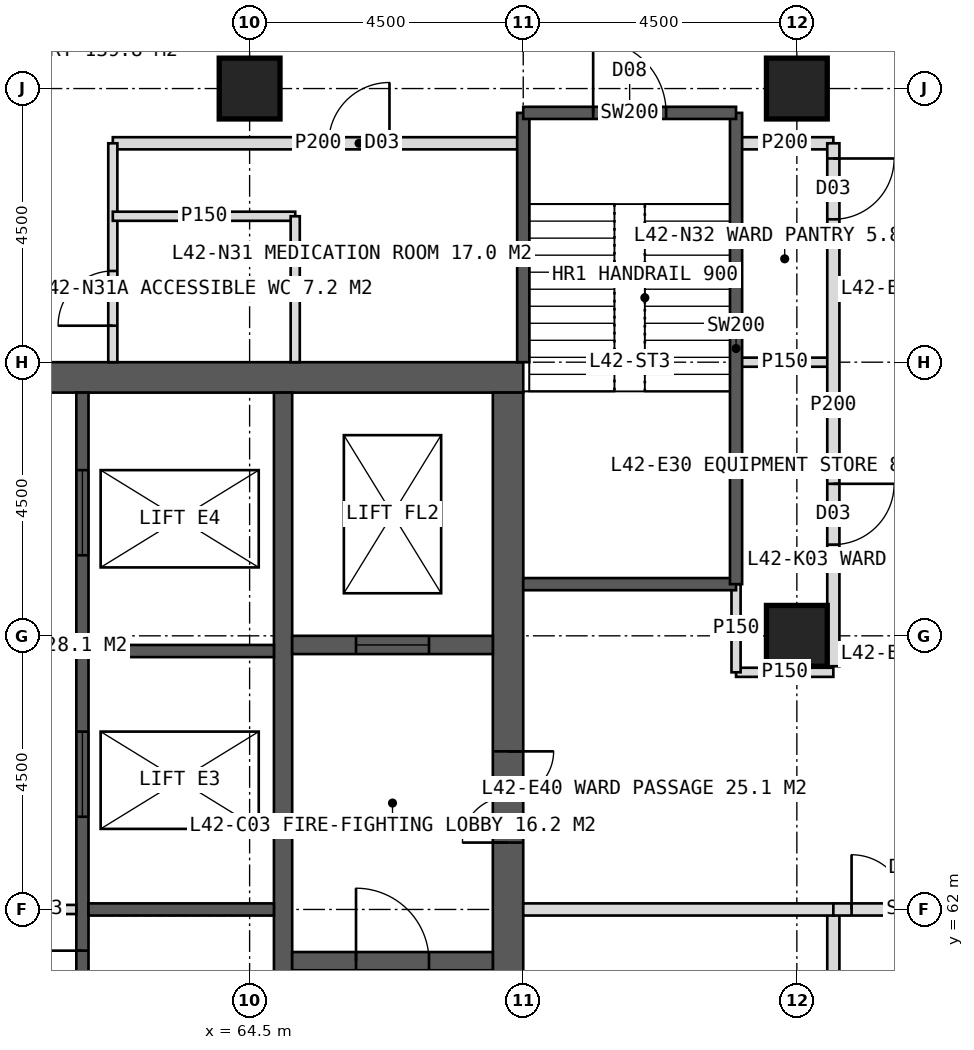
"""IFC4 building model, lengths in metres.
Left out: names, types, materials, properties, quantities, classifications, styles, units other than length and angle.
Written with IfcOpenShell. Run it as: python <this file> out.ifc"""

import sys

from ifc_helpers import new_model, si_unit, direction, frame, frame_2d, origin, origin_2d, place, context, subcontext, project, spatial, rectangle, hollow_rectangle, extrude, element, fill, save


model = new_model("IFC4")
c1 = context("Model", 3, precision=1e-05, world=origin(), true_north=direction((0.0, 1.0)))
c2 = subcontext(c1, "Body", "Model", "MODEL_VIEW")
j1 = project(units=[si_unit("LENGTHUNIT", "METRE"), si_unit("PLANEANGLEUNIT", "RADIAN")], contexts=[c1])
p1 = place(None, origin())
s1 = spatial("IfcSite", under=j1, at=p1, CompositionType="ELEMENT")
p2 = place(p1, origin())
s2 = spatial("IfcBuilding", under=s1, at=p2, CompositionType="ELEMENT")
p3 = place(p2, frame((0.0, 0.0, 177.0)))
s3 = spatial("IfcBuildingStorey", under=s2, at=p3, CompositionType="ELEMENT", Elevation=177.0)
p4 = place(p3, frame((51.0, 70.75, 0.0), z_axis=(0.0, 0.0, 1.0), x_axis=(1.0, 0.0, 0.0)))
e1 = element("IfcWall", 1, at=p4, inside=s3, PredefinedType="SHEAR", context=c2, shape_type="SweptSolid", body=[
    extrude(rectangle(XDim=18.0, YDim=0.5, at=frame_2d((9.0, 0.0))), origin(), (0.0, 0.0, 1.0), 4.0),
])
p5 = place(p4, frame((8.1, 0.0, 0.0)))
e2 = element("IfcOpeningElement", 2, at=p5, cuts=e1, PredefinedType="OPENING", context=c2, shape_type="SweptSolid", body=[
    extrude(rectangle(XDim=1.8, YDim=2.2, at=frame_2d((0.9, 1.1))), frame((0.0, 0.26, 0.0), z_axis=(0.0, -1.0, 0.0), x_axis=(1.0, 0.0, 0.0)), (0.0, 0.0, 1.0), 0.52),
])
p6 = place(p3, frame((68.75, 53.5, 0.0), z_axis=(0.0, 0.0, 1.0), x_axis=(0.0, 1.0, 0.0)))
e3 = element("IfcWall", 3, at=p6, inside=s3, PredefinedType="SHEAR", context=c2, shape_type="SweptSolid", body=[
    extrude(rectangle(XDim=17.0, YDim=0.5, at=frame_2d((8.5, 0.0))), origin(), (0.0, 0.0, 1.0), 4.0),
])
p7 = place(p6, frame((9.6, 0.0, 0.0)))
e4 = element("IfcOpeningElement", 4, at=p7, cuts=e3, PredefinedType="OPENING", context=c2, shape_type="SweptSolid", body=[
    extrude(rectangle(XDim=1.5, YDim=2.2, at=frame_2d((0.75, 1.1))), frame((0.0, 0.26, 0.0), z_axis=(0.0, -1.0, 0.0), x_axis=(1.0, 0.0, 0.0)), (0.0, 0.0, 1.0), 0.52),
])
p8 = place(p3, frame((65.05, 53.5, 0.0), z_axis=(0.0, 0.0, 1.0), x_axis=(0.0, 1.0, 0.0)))
e5 = element("IfcWall", 5, at=p8, inside=s3, PredefinedType="SHEAR", context=c2, shape_type="SweptSolid", body=[
    extrude(rectangle(XDim=17.0, YDim=0.3, at=frame_2d((8.5, 0.0))), origin(), (0.0, 0.0, 1.0), 4.0),
])
p9 = place(p3, frame((61.75, 53.5, 0.0), z_axis=(0.0, 0.0, 1.0), x_axis=(0.0, 1.0, 0.0)))
e6 = element("IfcWall", 6, at=p9, inside=s3, PredefinedType="SHEAR", context=c2, shape_type="SweptSolid", body=[
    extrude(rectangle(XDim=17.0, YDim=0.2, at=frame_2d((8.5, 0.0))), origin(), (0.0, 0.0, 1.0), 4.0),
])
p10 = place(p9, frame((0.808, 0.0, 0.0)))
e7 = element("IfcOpeningElement", 7, at=p10, cuts=e6, PredefinedType="OPENING", context=c2, shape_type="SweptSolid", body=[
    extrude(rectangle(XDim=1.0, YDim=2.1, at=frame_2d((0.5, 1.05))), frame((0.0, 0.11, 0.0), z_axis=(0.0, -1.0, 0.0), x_axis=(1.0, 0.0, 0.0)), (0.0, 0.0, 1.0), 0.22),
])
p11 = place(p9, frame((2.958, 0.0, 0.0)))
e8 = element("IfcOpeningElement", 8, at=p11, cuts=e6, PredefinedType="OPENING", context=c2, shape_type="SweptSolid", body=[
    extrude(rectangle(XDim=1.0, YDim=2.1, at=frame_2d((0.5, 1.05))), frame((0.0, 0.11, 0.0), z_axis=(0.0, -1.0, 0.0), x_axis=(1.0, 0.0, 0.0)), (0.0, 0.0, 1.0), 0.22),
])
p12 = place(p9, frame((4.722, 0.0, 0.0)))
e9 = element("IfcOpeningElement", 9, at=p12, cuts=e6, PredefinedType="OPENING", context=c2, shape_type="SweptSolid", body=[
    extrude(rectangle(XDim=1.0, YDim=2.1, at=frame_2d((0.5, 1.05))), frame((0.0, 0.11, 0.0), z_axis=(0.0, -1.0, 0.0), x_axis=(1.0, 0.0, 0.0)), (0.0, 0.0, 1.0), 0.22),
])
p13 = place(p9, frame((6.823, 0.0, 0.0)))
e10 = element("IfcOpeningElement", 10, at=p13, cuts=e6, PredefinedType="OPENING", context=c2, shape_type="SweptSolid", body=[
    extrude(rectangle(XDim=1.0, YDim=2.1, at=frame_2d((0.5, 1.05))), frame((0.0, 0.11, 0.0), z_axis=(0.0, -1.0, 0.0), x_axis=(1.0, 0.0, 0.0)), (0.0, 0.0, 1.0), 0.22),
])
p14 = place(p9, frame((10.025, 0.0, 0.0)))
e11 = element("IfcOpeningElement", 11, at=p14, cuts=e6, PredefinedType="OPENING", context=c2, shape_type="SweptSolid", body=[
    extrude(rectangle(XDim=1.4, YDim=2.2, at=frame_2d((0.7, 1.1))), frame((0.0, 0.11, 0.0), z_axis=(0.0, -1.0, 0.0), x_axis=(1.0, 0.0, 0.0)), (0.0, 0.0, 1.0), 0.22),
])
p15 = place(p9, frame((14.325, 0.0, 0.0)))
e12 = element("IfcOpeningElement", 12, at=p15, cuts=e6, PredefinedType="OPENING", context=c2, shape_type="SweptSolid", body=[
    extrude(rectangle(XDim=1.4, YDim=2.2, at=frame_2d((0.7, 1.1))), frame((0.0, 0.11, 0.0), z_axis=(0.0, -1.0, 0.0), x_axis=(1.0, 0.0, 0.0)), (0.0, 0.0, 1.0), 0.22),
])
for number, where, z_axis, x_axis in (
    (13, (61.85, 62.0, 0.0), (0.0, 0.0, 1.0), (1.0, 0.0, 0.0)),
    (14, (61.85, 66.25, 0.0), (0.0, 0.0, 1.0), (1.0, 0.0, 0.0)),
):
    element("IfcWall", number, at=place(p3, frame(where, z_axis=z_axis, x_axis=x_axis)), inside=s3, PredefinedType="SHEAR", context=c2, shape_type="SweptSolid", body=[
        extrude(rectangle(XDim=3.05, YDim=0.2, at=frame_2d((1.525, 0.0))), origin(), (0.0, 0.0, 1.0), 4.0),
    ])
p16 = place(p3, frame((65.2, 61.15, 0.0), z_axis=(0.0, 0.0, 1.0), x_axis=(1.0, 0.0, 0.0)))
e15 = element("IfcWall", 15, at=p16, inside=s3, PredefinedType="SHEAR", context=c2, shape_type="SweptSolid", body=[
    extrude(rectangle(XDim=3.3, YDim=0.3, at=frame_2d((1.65, 0.0))), origin(), (0.0, 0.0, 1.0), 4.0),
])
p17 = place(p16, frame((1.05, 0.0, 0.0)))
e16 = element("IfcOpeningElement", 16, at=p17, cuts=e15, PredefinedType="OPENING", context=c2, shape_type="SweptSolid", body=[
    extrude(rectangle(XDim=1.2, YDim=2.1, at=frame_2d((0.6, 1.05))), frame((0.0, 0.16, 0.0), z_axis=(0.0, -1.0, 0.0), x_axis=(1.0, 0.0, 0.0)), (0.0, 0.0, 1.0), 0.32),
])
p18 = place(p3, frame((65.2, 66.35, 0.0), z_axis=(0.0, 0.0, 1.0), x_axis=(1.0, 0.0, 0.0)))
e17 = element("IfcWall", 17, at=p18, inside=s3, PredefinedType="SHEAR", context=c2, shape_type="SweptSolid", body=[
    extrude(rectangle(XDim=3.3, YDim=0.3, at=frame_2d((1.65, 0.0))), origin(), (0.0, 0.0, 1.0), 4.0),
])
p19 = place(p18, frame((1.05, 0.0, 0.0)))
e18 = element("IfcOpeningElement", 18, at=p19, cuts=e17, PredefinedType="OPENING", context=c2, shape_type="SweptSolid", body=[
    extrude(rectangle(XDim=1.2, YDim=2.2, at=frame_2d((0.6, 1.1))), frame((0.0, 0.16, 0.0), z_axis=(0.0, -1.0, 0.0), x_axis=(1.0, 0.0, 0.0)), (0.0, 0.0, 1.0), 0.32),
])
for number, where, z_axis, x_axis in (
    (19, (73.5, 75.5, 0.0), (0.0, 0.0, 1.0), (1.0, 0.0, 0.0)),
    (20, (64.5, 75.5, 0.0), (0.0, 0.0, 1.0), (1.0, 0.0, 0.0)),
    (21, (73.5, 66.5, 0.0), (0.0, 0.0, 1.0), (1.0, 0.0, 0.0)),
):
    element("IfcColumn", number, at=place(p3, frame(where, z_axis=z_axis, x_axis=x_axis)), inside=s3, PredefinedType="COLUMN", context=c2, shape_type="SweptSolid", body=[
        extrude(hollow_rectangle(XDim=1.0, YDim=1.0, WallThickness=0.1, at=origin_2d()), origin(), (0.0, 0.0, 1.0), 4.0),
    ])
p20 = place(p3, frame((62.25, 74.6, 0.0), z_axis=(0.0, 0.0, 1.0), x_axis=(1.0, 0.0, 0.0)))
e22 = element("IfcWall", 22, at=p20, inside=s3, PredefinedType="PARTITIONING", context=c2, shape_type="SweptSolid", body=[
    extrude(rectangle(XDim=6.75, YDim=0.2, at=frame_2d((3.375, 0.0))), origin(), (0.0, 0.0, 1.0), 3.75),
])
p21 = place(p20, frame((3.55, 0.0, 0.0)))
e23 = element("IfcOpeningElement", 23, at=p21, cuts=e22, PredefinedType="OPENING", context=c2, shape_type="SweptSolid", body=[
    extrude(rectangle(XDim=1.0, YDim=2.1, at=frame_2d((0.5, 1.05))), frame((0.0, 0.11, 0.0), z_axis=(0.0, -1.0, 0.0), x_axis=(1.0, 0.0, 0.0)), (0.0, 0.0, 1.0), 0.22),
])
p22 = place(p3, frame((72.5, 74.6, 0.0), z_axis=(0.0, 0.0, 1.0), x_axis=(1.0, 0.0, 0.0)))
e24 = element("IfcWall", 24, at=p22, inside=s3, PredefinedType="PARTITIONING", context=c2, shape_type="SweptSolid", body=[
    extrude(rectangle(XDim=1.6, YDim=0.2, at=frame_2d((0.8, 0.0))), origin(), (0.0, 0.0, 1.0), 3.75),
])
p23 = place(p3, frame((62.25, 71.0, 0.0), z_axis=(0.0, 0.0, 1.0), x_axis=(0.0, 1.0, 0.0)))
e25 = element("IfcWall", 25, at=p23, inside=s3, PredefinedType="PARTITIONING", context=c2, shape_type="SweptSolid", body=[
    extrude(rectangle(XDim=3.6, YDim=0.15, at=frame_2d((1.8, 0.0))), origin(), (0.0, 0.0, 1.0), 3.75),
])
p24 = place(p23, frame((0.6, 0.0, 0.0)))
e26 = element("IfcOpeningElement", 26, at=p24, cuts=e25, PredefinedType="OPENING", context=c2, shape_type="SweptSolid", body=[
    extrude(rectangle(XDim=0.9, YDim=2.1, at=frame_2d((0.45, 1.05))), frame((0.0, 0.085, 0.0), z_axis=(0.0, -1.0, 0.0), x_axis=(1.0, 0.0, 0.0)), (0.0, 0.0, 1.0), 0.17),
])
p25 = place(p3, frame((62.25, 73.4, 0.0), z_axis=(0.0, 0.0, 1.0), x_axis=(1.0, 0.0, 0.0)))
e27 = element("IfcWall", 27, at=p25, inside=s3, PredefinedType="PARTITIONING", context=c2, shape_type="SweptSolid", body=[
    extrude(rectangle(XDim=3.0, YDim=0.15, at=frame_2d((1.5, 0.0))), origin(), (0.0, 0.0, 1.0), 3.75),
])
p26 = place(p3, frame((65.25, 71.0, 0.0), z_axis=(0.0, 0.0, 1.0), x_axis=(0.0, 1.0, 0.0)))
e28 = element("IfcWall", 28, at=p26, inside=s3, PredefinedType="PARTITIONING", context=c2, shape_type="SweptSolid", body=[
    extrude(rectangle(XDim=2.4, YDim=0.15, at=frame_2d((1.2, 0.0))), origin(), (0.0, 0.0, 1.0), 3.75),
])
p27 = place(p3, frame((72.5, 71.0, 0.0), z_axis=(0.0, 0.0, 1.0), x_axis=(1.0, 0.0, 0.0)))
e29 = element("IfcWall", 29, at=p27, inside=s3, PredefinedType="PARTITIONING", context=c2, shape_type="SweptSolid", body=[
    extrude(rectangle(XDim=1.6, YDim=0.15, at=frame_2d((0.8, 0.0))), origin(), (0.0, 0.0, 1.0), 3.75),
])
p28 = place(p3, frame((74.1, 74.6, 0.0), z_axis=(0.0, 0.0, 1.0), x_axis=(0.0, -1.0, 0.0)))
e30 = element("IfcWall", 30, at=p28, inside=s3, PredefinedType="PARTITIONING", context=c2, shape_type="SweptSolid", body=[
    extrude(rectangle(XDim=8.6, YDim=0.2, at=frame_2d((4.3, 0.0))), origin(), (0.0, 0.0, 1.0), 3.75),
])
p29 = place(p28, frame((0.25, 0.0, 0.0)))
e31 = element("IfcOpeningElement", 31, at=p29, cuts=e30, PredefinedType="OPENING", context=c2, shape_type="SweptSolid", body=[
    extrude(rectangle(XDim=1.0, YDim=2.1, at=frame_2d((0.5, 1.05))), frame((0.0, 0.11, 0.0), z_axis=(0.0, -1.0, 0.0), x_axis=(1.0, 0.0, 0.0)), (0.0, 0.0, 1.0), 0.22),
])
p30 = place(p28, frame((5.6, 0.0, 0.0)))
e32 = element("IfcOpeningElement", 32, at=p30, cuts=e30, PredefinedType="OPENING", context=c2, shape_type="SweptSolid", body=[
    extrude(rectangle(XDim=1.0, YDim=2.1, at=frame_2d((0.5, 1.05))), frame((0.0, 0.11, 0.0), z_axis=(0.0, -1.0, 0.0), x_axis=(1.0, 0.0, 0.0)), (0.0, 0.0, 1.0), 0.22),
])
p31 = place(p3, frame((74.1, 62.0, 0.0), z_axis=(0.0, 0.0, 1.0), x_axis=(0.0, -1.0, 0.0)))
e33 = element("IfcWall", 33, at=p31, inside=s3, PredefinedType="PARTITIONING", context=c2, shape_type="SweptSolid", body=[
    extrude(rectangle(XDim=14.1, YDim=0.2, at=frame_2d((7.05, 0.0))), origin(), (0.0, 0.0, 1.0), 3.75),
])
p32 = place(p31, frame((1.45, 0.0, 0.0)))
e34 = element("IfcOpeningElement", 34, at=p32, cuts=e33, PredefinedType="OPENING", context=c2, shape_type="SweptSolid", body=[
    extrude(rectangle(XDim=1.0, YDim=2.1, at=frame_2d((0.5, 1.05))), frame((0.0, 0.11, 0.0), z_axis=(0.0, -1.0, 0.0), x_axis=(1.0, 0.0, 0.0)), (0.0, 0.0, 1.0), 0.22),
])
p33 = place(p31, frame((11.05, 0.0, 0.0)))
e35 = element("IfcOpeningElement", 35, at=p33, cuts=e33, PredefinedType="OPENING", context=c2, shape_type="SweptSolid", body=[
    extrude(rectangle(XDim=1.0, YDim=2.1, at=frame_2d((0.5, 1.05))), frame((0.0, 0.11, 0.0), z_axis=(0.0, -1.0, 0.0), x_axis=(1.0, 0.0, 0.0)), (0.0, 0.0, 1.0), 0.22),
])
p34 = place(p3, frame((72.5, 65.9, 0.0), z_axis=(0.0, 0.0, 1.0), x_axis=(1.0, 0.0, 0.0)))
e36 = element("IfcWall", 36, at=p34, inside=s3, PredefinedType="PARTITIONING", context=c2, shape_type="SweptSolid", body=[
    extrude(rectangle(XDim=1.6, YDim=0.15, at=frame_2d((0.8, 0.0))), origin(), (0.0, 0.0, 1.0), 3.75),
])
p35 = place(p3, frame((69.0, 62.0, 0.0), z_axis=(0.0, 0.0, 1.0), x_axis=(1.0, 0.0, 0.0)))
e37 = element("IfcWall", 37, at=p35, inside=s3, PredefinedType="SOLIDWALL", context=c2, shape_type="SweptSolid", body=[
    extrude(rectangle(XDim=5.1, YDim=0.2, at=frame_2d((2.55, 0.0))), origin(), (0.0, 0.0, 1.0), 2.95),
])
p36 = place(p3, frame((74.1, 62.0, 0.0), z_axis=(0.0, 0.0, 1.0), x_axis=(1.0, 0.0, 0.0)))
e38 = element("IfcWall", 38, at=p36, inside=s3, PredefinedType="SOLIDWALL", context=c2, shape_type="SweptSolid", body=[
    extrude(rectangle(XDim=2.7, YDim=0.2, at=frame_2d((1.35, 0.0))), origin(), (0.0, 0.0, 1.0), 2.95),
])
p37 = place(p36, frame((0.3, 0.0, 0.0)))
e39 = element("IfcOpeningElement", 39, at=p37, cuts=e38, PredefinedType="OPENING", context=c2, shape_type="SweptSolid", body=[
    extrude(rectangle(XDim=1.8, YDim=2.2, at=frame_2d((0.9, 1.1))), frame((0.0, 0.11, 0.0), z_axis=(0.0, -1.0, 0.0), x_axis=(1.0, 0.0, 0.0)), (0.0, 0.0, 1.0), 0.22),
])
p38 = place(p3, frame((58.35, 62.0, 0.0), z_axis=(0.0, 0.0, 1.0), x_axis=(1.0, 0.0, 0.0)))
e40 = element("IfcWall", 40, at=p38, inside=s3, PredefinedType="PARTITIONING", context=c2, shape_type="SweptSolid", body=[
    extrude(rectangle(XDim=3.3, YDim=0.15, at=frame_2d((1.65, 0.0))), origin(), (0.0, 0.0, 1.0), 3.75),
])
p39 = place(p3, frame((72.5, 65.9, 0.0), z_axis=(0.0, 0.0, 1.0), x_axis=(0.0, 1.0, 0.0)))
e41 = element("IfcWall", 41, at=p39, inside=s3, PredefinedType="PARTITIONING", context=c2, shape_type="SweptSolid", body=[
    extrude(rectangle(XDim=1.45, YDim=0.15, at=frame_2d((0.725, 0.0))), origin(), (0.0, 0.0, 1.0), 3.75),
])
p40 = place(p3, frame((69.0, 71.0, 0.0), z_axis=(0.0, 0.0, 1.0), x_axis=(0.0, 1.0, 0.0)))
e42 = element("IfcWall", 42, at=p40, inside=s3, PredefinedType="SOLIDWALL", context=c2, shape_type="SweptSolid", body=[
    extrude(rectangle(XDim=4.1, YDim=0.2, at=frame_2d((2.05, 0.0))), origin(), (0.0, 0.0, 1.0), 3.75),
])
p41 = place(p3, frame((69.0, 67.35, 0.0), z_axis=(0.0, 0.0, 1.0), x_axis=(1.0, 0.0, 0.0)))
e43 = element("IfcWall", 43, at=p41, inside=s3, PredefinedType="SOLIDWALL", context=c2, shape_type="SweptSolid", body=[
    extrude(rectangle(XDim=3.5, YDim=0.2, at=frame_2d((1.75, 0.0))), origin(), (0.0, 0.0, 1.0), 3.75),
])
p42 = place(p3, frame((72.5, 67.35, 0.0), z_axis=(0.0, 0.0, 1.0), x_axis=(0.0, 1.0, 0.0)))
e44 = element("IfcWall", 44, at=p42, inside=s3, PredefinedType="SOLIDWALL", context=c2, shape_type="SweptSolid", body=[
    extrude(rectangle(XDim=7.75, YDim=0.2, at=frame_2d((3.875, 0.0))), origin(), (0.0, 0.0, 1.0), 3.75),
])
p43 = place(p3, frame((69.0, 75.1, 0.0), z_axis=(0.0, 0.0, 1.0), x_axis=(1.0, 0.0, 0.0)))
e45 = element("IfcWall", 45, at=p43, inside=s3, PredefinedType="SOLIDWALL", context=c2, shape_type="SweptSolid", body=[
    extrude(rectangle(XDim=3.5, YDim=0.2, at=frame_2d((1.75, 0.0))), origin(), (0.0, 0.0, 1.0), 3.75),
])
p44 = place(p43, frame((1.15, 0.0, 0.0)))
e46 = element("IfcOpeningElement", 46, at=p44, cuts=e45, PredefinedType="OPENING", context=c2, shape_type="SweptSolid", body=[
    extrude(rectangle(XDim=1.2, YDim=2.1, at=frame_2d((0.6, 1.05))), frame((0.0, 0.11, 0.0), z_axis=(0.0, -1.0, 0.0), x_axis=(1.0, 0.0, 0.0)), (0.0, 0.0, 1.0), 0.22),
])
p45 = place(p24, origin())
e47 = element("IfcDoor", 47, at=p45, inside=s3, OperationType="SINGLE_SWING_LEFT", PredefinedType="DOOR", context=c2, shape_type="SweptSolid", body=[
    extrude(rectangle(XDim=0.9, YDim=2.1, at=frame_2d((0.45, 1.05))), frame((0.0, 0.025, 0.0), z_axis=(0.0, -1.0, 0.0), x_axis=(1.0, 0.0, 0.0)), (0.0, 0.0, 1.0), 0.05),
])
fill(e26, e47)
p46 = place(p21, origin())
e48 = element("IfcDoor", 48, at=p46, inside=s3, OperationType="SINGLE_SWING_RIGHT", PredefinedType="DOOR", context=c2, shape_type="SweptSolid", body=[
    extrude(rectangle(XDim=1.0, YDim=2.1, at=frame_2d((0.5, 1.05))), frame((0.0, 0.025, 0.0), z_axis=(0.0, -1.0, 0.0), x_axis=(1.0, 0.0, 0.0)), (0.0, 0.0, 1.0), 0.05),
])
fill(e23, e48)
p47 = place(p29, origin())
e49 = element("IfcDoor", 49, at=p47, inside=s3, OperationType="SINGLE_SWING_LEFT", PredefinedType="DOOR", context=c2, shape_type="SweptSolid", body=[
    extrude(rectangle(XDim=1.0, YDim=2.1, at=frame_2d((0.5, 1.05))), frame((0.0, 0.025, 0.0), z_axis=(0.0, -1.0, 0.0), x_axis=(1.0, 0.0, 0.0)), (0.0, 0.0, 1.0), 0.05),
])
fill(e31, e49)
p48 = place(p30, origin())
e50 = element("IfcDoor", 50, at=p48, inside=s3, OperationType="SINGLE_SWING_LEFT", PredefinedType="DOOR", context=c2, shape_type="SweptSolid", body=[
    extrude(rectangle(XDim=1.0, YDim=2.1, at=frame_2d((0.5, 1.05))), frame((0.0, 0.025, 0.0), z_axis=(0.0, -1.0, 0.0), x_axis=(1.0, 0.0, 0.0)), (0.0, 0.0, 1.0), 0.05),
])
fill(e32, e50)
p49 = place(p37, origin())
e51 = element("IfcDoor", 51, at=p49, inside=s3, OperationType="DOUBLE_DOOR_DOUBLE_SWING", PredefinedType="DOOR", context=c2, shape_type="SweptSolid", body=[
    extrude(rectangle(XDim=1.8, YDim=2.2, at=frame_2d((0.9, 1.1))), frame((0.0, 0.025, 0.0), z_axis=(0.0, -1.0, 0.0), x_axis=(1.0, 0.0, 0.0)), (0.0, 0.0, 1.0), 0.05),
])
fill(e39, e51)
p50 = place(p7, origin())
e52 = element("IfcDoor", 52, at=p50, inside=s3, OperationType="DOUBLE_DOOR_SINGLE_SWING", PredefinedType="DOOR", context=c2, shape_type="SweptSolid", body=[
    extrude(rectangle(XDim=1.5, YDim=2.2, at=frame_2d((0.75, 1.1))), frame((0.0, 0.025, 0.0), z_axis=(0.0, -1.0, 0.0), x_axis=(1.0, 0.0, 0.0)), (0.0, 0.0, 1.0), 0.05),
])
fill(e4, e52)
p51 = place(p17, origin())
e53 = element("IfcDoor", 53, at=p51, inside=s3, OperationType="SINGLE_SWING_LEFT", PredefinedType="DOOR", context=c2, shape_type="SweptSolid", body=[
    extrude(rectangle(XDim=1.2, YDim=2.1, at=frame_2d((0.6, 1.05))), frame((0.0, 0.025, 0.0), z_axis=(0.0, -1.0, 0.0), x_axis=(1.0, 0.0, 0.0)), (0.0, 0.0, 1.0), 0.05),
])
fill(e16, e53)
p52 = place(p19, origin())
e54 = element("IfcDoor", 54, at=p52, inside=s3, OperationType="SLIDING_TO_LEFT", PredefinedType="DOOR", context=c2, shape_type="SweptSolid", body=[
    extrude(rectangle(XDim=1.2, YDim=2.2, at=frame_2d((0.6, 1.1))), frame((0.0, 0.025, 0.0), z_axis=(0.0, -1.0, 0.0), x_axis=(1.0, 0.0, 0.0)), (0.0, 0.0, 1.0), 0.05),
])
fill(e18, e54)
p53 = place(p13, origin())
e55 = element("IfcDoor", 55, at=p53, inside=s3, OperationType="SINGLE_SWING_RIGHT", PredefinedType="DOOR", context=c2, shape_type="SweptSolid", body=[
    extrude(rectangle(XDim=1.0, YDim=2.1, at=frame_2d((0.5, 1.05))), frame((0.0, 0.025, 0.0), z_axis=(0.0, -1.0, 0.0), x_axis=(1.0, 0.0, 0.0)), (0.0, 0.0, 1.0), 0.05),
])
fill(e10, e55)
p54 = place(p14, origin())
e56 = element("IfcDoor", 56, at=p54, inside=s3, OperationType="SLIDING_TO_LEFT", PredefinedType="DOOR", context=c2, shape_type="SweptSolid", body=[
    extrude(rectangle(XDim=1.4, YDim=2.2, at=frame_2d((0.7, 1.1))), frame((0.0, 0.025, 0.0), z_axis=(0.0, -1.0, 0.0), x_axis=(1.0, 0.0, 0.0)), (0.0, 0.0, 1.0), 0.05),
])
fill(e11, e56)
p55 = place(p15, origin())
e57 = element("IfcDoor", 57, at=p55, inside=s3, OperationType="SLIDING_TO_LEFT", PredefinedType="DOOR", context=c2, shape_type="SweptSolid", body=[
    extrude(rectangle(XDim=1.4, YDim=2.2, at=frame_2d((0.7, 1.1))), frame((0.0, 0.025, 0.0), z_axis=(0.0, -1.0, 0.0), x_axis=(1.0, 0.0, 0.0)), (0.0, 0.0, 1.0), 0.05),
])
fill(e12, e57)
p56 = place(p44, origin())
e58 = element("IfcDoor", 58, at=p56, inside=s3, OperationType="SINGLE_SWING_LEFT", PredefinedType="DOOR", context=c2, shape_type="SweptSolid", body=[
    extrude(rectangle(XDim=1.2, YDim=2.1, at=frame_2d((0.6, 1.05))), frame((0.0, 0.025, 0.0), z_axis=(0.0, -1.0, 0.0), x_axis=(1.0, 0.0, 0.0)), (0.0, 0.0, 1.0), 0.05),
])
fill(e46, e58)
save(model, sys.argv[1])
